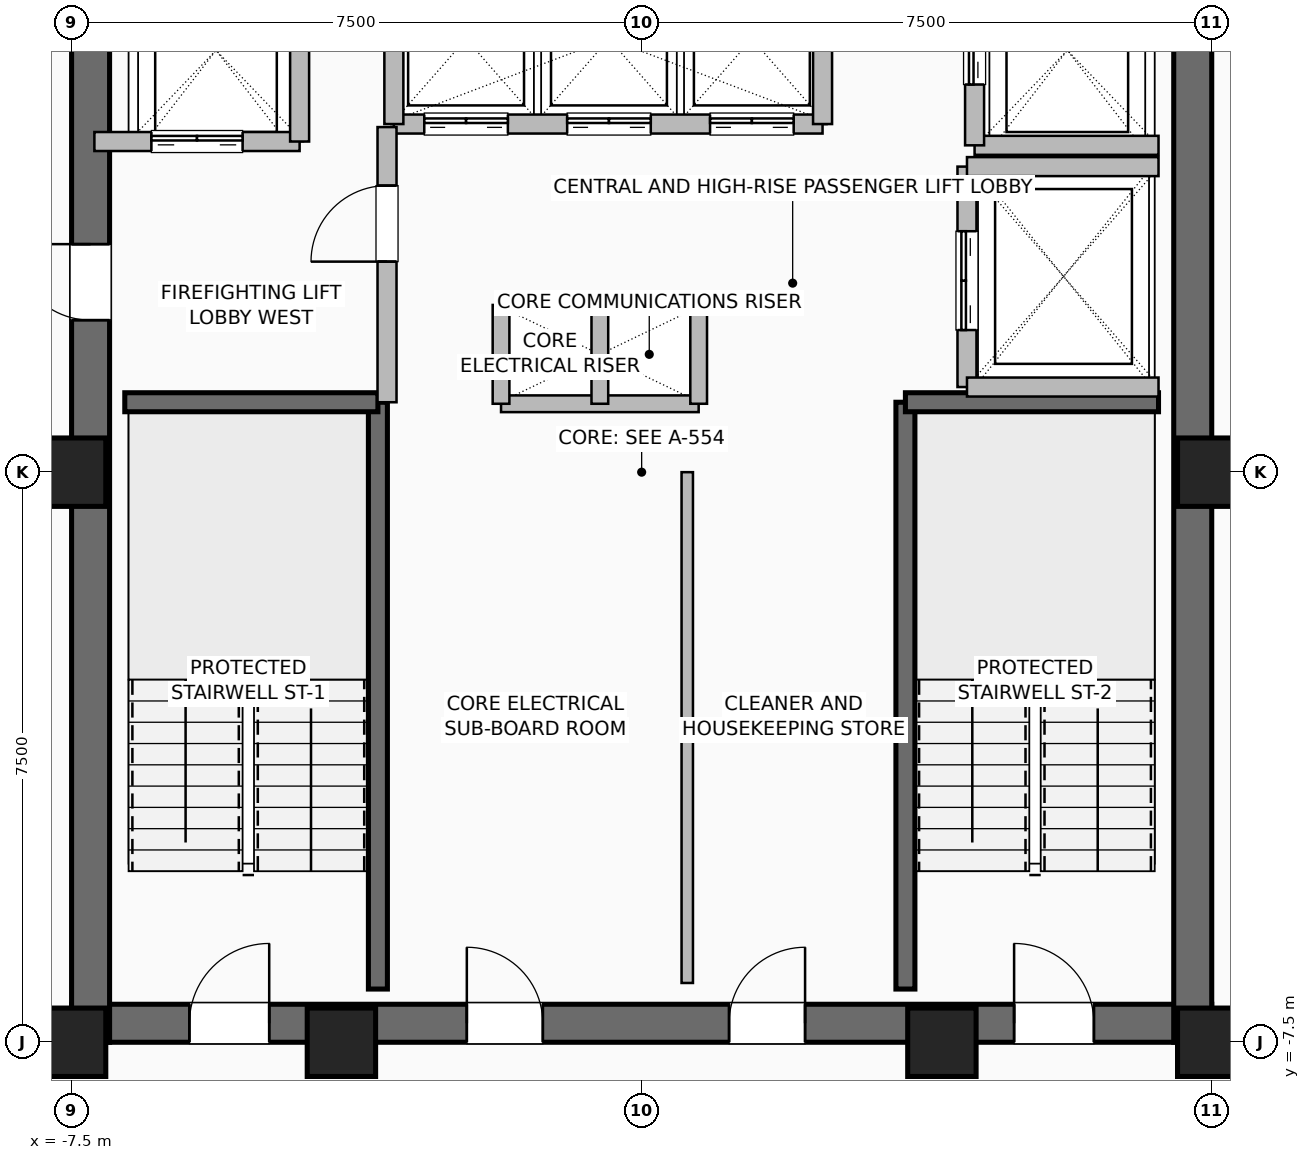
"""IFC4 building model, lengths in metres.
Left out: names, types, materials, properties, quantities, classifications, styles, units other than length and angle.
Written with IfcOpenShell. Run it as: python <this file> out.ifc"""

import sys

from ifc_helpers import new_model, si_unit, direction, frame, frame_2d, origin, origin_2d, place, context, subcontext, project, spatial, rectangle, hollow_rectangle, extrude, element, fill, save


model = new_model("IFC4")
c1 = context("Model", 3, precision=1e-05, world=origin(), true_north=direction((0.0, 1.0)))
c2 = subcontext(c1, "Body", "Model", "MODEL_VIEW")
j1 = project(units=[si_unit("LENGTHUNIT", "METRE"), si_unit("PLANEANGLEUNIT", "RADIAN")], contexts=[c1])
p1 = place(None, origin())
s1 = spatial("IfcSite", under=j1, at=p1, CompositionType="ELEMENT")
p2 = place(p1, origin())
s2 = spatial("IfcBuilding", under=s1, at=p2, CompositionType="ELEMENT")
p3 = place(p2, frame((0.0, 0.0, 213.0)))
s3 = spatial("IfcBuildingStorey", under=s2, at=p3, CompositionType="ELEMENT", Elevation=213.0)
for number, where, z_axis, x_axis in (
    (1, (-7.5, -7.5, 0.0), (0.0, 0.0, 1.0), (1.0, 0.0, 0.0)),
    (2, (-3.95, -7.5, 0.0), (0.0, 0.0, 1.0), (1.0, 0.0, 0.0)),
    (3, (3.95, -7.5, 0.0), (0.0, 0.0, 1.0), (1.0, 0.0, 0.0)),
    (4, (7.5, -7.5, 0.0), (0.0, 0.0, 1.0), (1.0, 0.0, 0.0)),
    (5, (7.5, 0.0, 0.0), (0.0, 0.0, 1.0), (1.0, 0.0, 0.0)),
    (6, (-7.5, 0.0, 0.0), (0.0, 0.0, 1.0), (1.0, 0.0, 0.0)),
):
    element("IfcColumn", number, at=place(p3, frame(where, z_axis=z_axis, x_axis=x_axis)), inside=s3, PredefinedType="COLUMN", context=c2, shape_type="SweptSolid", body=[
        extrude(hollow_rectangle(XDim=0.9, YDim=0.9, WallThickness=0.045, at=origin_2d()), origin(), (0.0, 0.0, 1.0), 3.6),
    ])
p4 = place(p3, frame((-7.5, -7.25, 0.0), z_axis=(0.0, 0.0, 1.0), x_axis=(1.0, 0.0, 0.0)))
e7 = element("IfcWall", 7, at=p4, inside=s3, PredefinedType="SHEAR", context=c2, shape_type="SweptSolid", body=[
    extrude(rectangle(XDim=15.0, YDim=0.5, at=frame_2d((7.5, 0.0))), origin(), (0.0, 0.0, 1.0), 3.36),
])
p5 = place(p4, frame((1.55, 0.0, 0.0)))
e8 = element("IfcOpeningElement", 8, at=p5, cuts=e7, PredefinedType="OPENING", context=c2, shape_type="SweptSolid", body=[
    extrude(rectangle(XDim=1.05, YDim=2.08, at=frame_2d((0.525, 1.04))), frame((0.0, 0.26, 0.0), z_axis=(0.0, -1.0, 0.0), x_axis=(1.0, 0.0, 0.0)), (0.0, 0.0, 1.0), 0.52),
])
p6 = place(p4, frame((12.4, 0.0, 0.0)))
e9 = element("IfcOpeningElement", 9, at=p6, cuts=e7, PredefinedType="OPENING", context=c2, shape_type="SweptSolid", body=[
    extrude(rectangle(XDim=1.05, YDim=2.08, at=frame_2d((0.525, 1.04))), frame((0.0, 0.26, 0.0), z_axis=(0.0, -1.0, 0.0), x_axis=(1.0, 0.0, 0.0)), (0.0, 0.0, 1.0), 0.52),
])
p7 = place(p4, frame((5.2, 0.0, 0.0)))
e10 = element("IfcOpeningElement", 10, at=p7, cuts=e7, PredefinedType="OPENING", context=c2, shape_type="SweptSolid", body=[
    extrude(rectangle(XDim=1.0, YDim=2.08, at=frame_2d((0.5, 1.04))), frame((0.0, 0.26, 0.0), z_axis=(0.0, -1.0, 0.0), x_axis=(1.0, 0.0, 0.0)), (0.0, 0.0, 1.0), 0.52),
])
p8 = place(p4, frame((8.65, 0.0, 0.0)))
e11 = element("IfcOpeningElement", 11, at=p8, cuts=e7, PredefinedType="OPENING", context=c2, shape_type="SweptSolid", body=[
    extrude(rectangle(XDim=1.0, YDim=2.08, at=frame_2d((0.5, 1.04))), frame((0.0, 0.26, 0.0), z_axis=(0.0, -1.0, 0.0), x_axis=(1.0, 0.0, 0.0)), (0.0, 0.0, 1.0), 0.52),
])
p9 = place(p3, frame((-7.25, -7.5, 0.0), z_axis=(0.0, 0.0, 1.0), x_axis=(0.0, 1.0, 0.0)))
e12 = element("IfcWall", 12, at=p9, inside=s3, PredefinedType="SHEAR", context=c2, shape_type="SweptSolid", body=[
    extrude(rectangle(XDim=15.0, YDim=0.5, at=frame_2d((7.5, 0.0))), origin(), (0.0, 0.0, 1.0), 3.36),
])
p10 = place(p9, frame((9.5, 0.0, 0.0)))
e13 = element("IfcOpeningElement", 13, at=p10, cuts=e12, PredefinedType="OPENING", context=c2, shape_type="SweptSolid", body=[
    extrude(rectangle(XDim=1.0, YDim=2.08, at=frame_2d((0.5, 1.04))), frame((0.0, 0.26, 0.0), z_axis=(0.0, -1.0, 0.0), x_axis=(1.0, 0.0, 0.0)), (0.0, 0.0, 1.0), 0.52),
])
p11 = place(p3, frame((7.25, -7.5, 0.0), z_axis=(0.0, 0.0, 1.0), x_axis=(0.0, 1.0, 0.0)))
e14 = element("IfcWall", 14, at=p11, inside=s3, PredefinedType="SHEAR", context=c2, shape_type="SweptSolid", body=[
    extrude(rectangle(XDim=15.0, YDim=0.5, at=frame_2d((7.5, 0.0))), origin(), (0.0, 0.0, 1.0), 3.36),
])
p12 = place(p3, frame((-3.47, -6.8, 0.0), z_axis=(0.0, 0.0, 1.0), x_axis=(0.0, 1.0, 0.0)))
e15 = element("IfcWall", 15, at=p12, inside=s3, PredefinedType="SHEAR", context=c2, shape_type="SweptSolid", body=[
    extrude(rectangle(XDim=7.72, YDim=0.25, at=frame_2d((3.86, 0.0))), origin(), (0.0, 0.0, 1.0), 3.36),
])
p13 = place(p3, frame((-6.8, 0.92, 0.0), z_axis=(0.0, 0.0, 1.0), x_axis=(1.0, 0.0, 0.0)))
e16 = element("IfcWall", 16, at=p13, inside=s3, PredefinedType="SHEAR", context=c2, shape_type="SweptSolid", body=[
    extrude(rectangle(XDim=3.33, YDim=0.25, at=frame_2d((1.665, 0.0))), origin(), (0.0, 0.0, 1.0), 3.36),
])
p14 = place(p3, frame((3.47, -6.8, 0.0), z_axis=(0.0, 0.0, 1.0), x_axis=(0.0, 1.0, 0.0)))
e17 = element("IfcWall", 17, at=p14, inside=s3, PredefinedType="SHEAR", context=c2, shape_type="SweptSolid", body=[
    extrude(rectangle(XDim=7.72, YDim=0.25, at=frame_2d((3.86, 0.0))), origin(), (0.0, 0.0, 1.0), 3.36),
])
p15 = place(p3, frame((3.47, 0.92, 0.0), z_axis=(0.0, 0.0, 1.0), x_axis=(1.0, 0.0, 0.0)))
e18 = element("IfcWall", 18, at=p15, inside=s3, PredefinedType="SHEAR", context=c2, shape_type="SweptSolid", body=[
    extrude(rectangle(XDim=3.33, YDim=0.25, at=frame_2d((1.665, 0.0))), origin(), (0.0, 0.0, 1.0), 3.36),
])
for number, where, z_axis, x_axis in (
    (19, (-1.85, 2.2, 0.0), (0.0, 0.0, 1.0), (1.0, 0.0, 0.0)),
    (20, (-1.85, 0.9, 0.0), (0.0, 0.0, 1.0), (1.0, 0.0, 0.0)),
):
    element("IfcWall", number, at=place(p3, frame(where, z_axis=z_axis, x_axis=x_axis)), inside=s3, PredefinedType="PARTITIONING", context=c2, shape_type="SweptSolid", body=[
        extrude(rectangle(XDim=2.6, YDim=0.22, at=frame_2d((1.3, 0.0))), origin(), (0.0, 0.0, 1.0), 3.36),
    ])
for number, where, z_axis, x_axis in (
    (21, (-0.55, 0.9, 0.0), (0.0, 0.0, 1.0), (0.0, 1.0, 0.0)),
    (22, (0.75, 0.9, 0.0), (0.0, 0.0, 1.0), (0.0, 1.0, 0.0)),
    (23, (-1.85, 0.9, 0.0), (0.0, 0.0, 1.0), (0.0, 1.0, 0.0)),
):
    element("IfcWall", number, at=place(p3, frame(where, z_axis=z_axis, x_axis=x_axis)), inside=s3, PredefinedType="PARTITIONING", context=c2, shape_type="SweptSolid", body=[
        extrude(rectangle(XDim=1.3, YDim=0.22, at=frame_2d((0.65, 0.0))), origin(), (0.0, 0.0, 1.0), 3.36),
    ])
p16 = place(p3, frame((-3.26, 4.58, 0.0), z_axis=(0.0, 0.0, 1.0), x_axis=(1.0, 0.0, 0.0)))
e24 = element("IfcWall", 24, at=p16, inside=s3, PredefinedType="SHEAR", context=c2, shape_type="SweptSolid", body=[
    extrude(rectangle(XDim=5.64, YDim=0.25, at=frame_2d((2.82, 0.0))), origin(), (0.0, 0.0, 1.0), 3.36),
])
p17 = place(p16, frame((0.4, 0.0, 0.0)))
e25 = element("IfcOpeningElement", 25, at=p17, cuts=e24, PredefinedType="OPENING", context=c2, shape_type="SweptSolid", body=[
    extrude(rectangle(XDim=1.1, YDim=2.2, at=frame_2d((0.55, 1.1))), frame((0.0, 0.135, 0.0), z_axis=(0.0, -1.0, 0.0), x_axis=(1.0, 0.0, 0.0)), (0.0, 0.0, 1.0), 0.27),
])
p18 = place(p16, frame((2.28, 0.0, 0.0)))
e26 = element("IfcOpeningElement", 26, at=p18, cuts=e24, PredefinedType="OPENING", context=c2, shape_type="SweptSolid", body=[
    extrude(rectangle(XDim=1.1, YDim=2.2, at=frame_2d((0.55, 1.1))), frame((0.0, 0.135, 0.0), z_axis=(0.0, -1.0, 0.0), x_axis=(1.0, 0.0, 0.0)), (0.0, 0.0, 1.0), 0.27),
])
p19 = place(p16, frame((4.16, 0.0, 0.0)))
e27 = element("IfcOpeningElement", 27, at=p19, cuts=e24, PredefinedType="OPENING", context=c2, shape_type="SweptSolid", body=[
    extrude(rectangle(XDim=1.1, YDim=2.2, at=frame_2d((0.55, 1.1))), frame((0.0, 0.135, 0.0), z_axis=(0.0, -1.0, 0.0), x_axis=(1.0, 0.0, 0.0)), (0.0, 0.0, 1.0), 0.27),
])
for number, where, z_axis, x_axis in (
    (28, (-3.26, 4.58, 0.0), (0.0, 0.0, 1.0), (0.0, 1.0, 0.0)),
    (29, (2.38, 4.58, 0.0), (0.0, 0.0, 1.0), (0.0, 1.0, 0.0)),
):
    element("IfcWall", number, at=place(p3, frame(where, z_axis=z_axis, x_axis=x_axis)), inside=s3, PredefinedType="SHEAR", context=c2, shape_type="SweptSolid", body=[
        extrude(rectangle(XDim=2.22, YDim=0.25, at=frame_2d((1.11, 0.0))), origin(), (0.0, 0.0, 1.0), 3.36),
    ])
p20 = place(p3, frame((-7.2, 4.35, 0.0), z_axis=(0.0, 0.0, 1.0), x_axis=(1.0, 0.0, 0.0)))
e30 = element("IfcWall", 30, at=p20, inside=s3, PredefinedType="SHEAR", context=c2, shape_type="SweptSolid", body=[
    extrude(rectangle(XDim=2.7, YDim=0.25, at=frame_2d((1.35, 0.0))), origin(), (0.0, 0.0, 1.0), 3.36),
])
p21 = place(p20, frame((0.75, 0.0, 0.0)))
e31 = element("IfcOpeningElement", 31, at=p21, cuts=e30, PredefinedType="OPENING", context=c2, shape_type="SweptSolid", body=[
    extrude(rectangle(XDim=1.2, YDim=2.2, at=frame_2d((0.6, 1.1))), frame((0.0, 0.135, 0.0), z_axis=(0.0, -1.0, 0.0), x_axis=(1.0, 0.0, 0.0)), (0.0, 0.0, 1.0), 0.27),
])
p22 = place(p3, frame((-4.5, 4.35, 0.0), z_axis=(0.0, 0.0, 1.0), x_axis=(0.0, 1.0, 0.0)))
e32 = element("IfcWall", 32, at=p22, inside=s3, PredefinedType="SHEAR", context=c2, shape_type="SweptSolid", body=[
    extrude(rectangle(XDim=2.85, YDim=0.25, at=frame_2d((1.425, 0.0))), origin(), (0.0, 0.0, 1.0), 3.36),
])
p23 = place(p3, frame((4.38, 4.3, 0.0), z_axis=(0.0, 0.0, 1.0), x_axis=(1.0, 0.0, 0.0)))
e33 = element("IfcWall", 33, at=p23, inside=s3, PredefinedType="SHEAR", context=c2, shape_type="SweptSolid", body=[
    extrude(rectangle(XDim=2.42, YDim=0.25, at=frame_2d((1.21, 0.0))), origin(), (0.0, 0.0, 1.0), 3.36),
])
p24 = place(p3, frame((4.38, 4.3, 0.0), z_axis=(0.0, 0.0, 1.0), x_axis=(0.0, 1.0, 0.0)))
e34 = element("IfcWall", 34, at=p24, inside=s3, PredefinedType="SHEAR", context=c2, shape_type="SweptSolid", body=[
    extrude(rectangle(XDim=2.5, YDim=0.25, at=frame_2d((1.25, 0.0))), origin(), (0.0, 0.0, 1.0), 3.36),
])
p25 = place(p24, frame((0.8, 0.0, 0.0)))
e35 = element("IfcOpeningElement", 35, at=p25, cuts=e34, PredefinedType="OPENING", context=c2, shape_type="SweptSolid", body=[
    extrude(rectangle(XDim=1.2, YDim=2.2, at=frame_2d((0.6, 1.1))), frame((0.0, 0.135, 0.0), z_axis=(0.0, -1.0, 0.0), x_axis=(1.0, 0.0, 0.0)), (0.0, 0.0, 1.0), 0.27),
])
p26 = place(p3, frame((4.28, 1.12, 0.0), z_axis=(0.0, 0.0, 1.0), x_axis=(0.0, 1.0, 0.0)))
e36 = element("IfcWall", 36, at=p26, inside=s3, PredefinedType="SHEAR", context=c2, shape_type="SweptSolid", body=[
    extrude(rectangle(XDim=2.9, YDim=0.25, at=frame_2d((1.45, 0.0))), origin(), (0.0, 0.0, 1.0), 3.36),
])
p27 = place(p26, frame((0.75, 0.0, 0.0)))
e37 = element("IfcOpeningElement", 37, at=p27, cuts=e36, PredefinedType="OPENING", context=c2, shape_type="SweptSolid", body=[
    extrude(rectangle(XDim=1.3, YDim=2.3, at=frame_2d((0.65, 1.15))), frame((0.0, 0.135, 0.0), z_axis=(0.0, -1.0, 0.0), x_axis=(1.0, 0.0, 0.0)), (0.0, 0.0, 1.0), 0.27),
])
for number, where, z_axis, x_axis in (
    (38, (4.28, 1.12, 0.0), (0.0, 0.0, 1.0), (1.0, 0.0, 0.0)),
    (39, (4.28, 4.02, 0.0), (0.0, 0.0, 1.0), (1.0, 0.0, 0.0)),
):
    element("IfcWall", number, at=place(p3, frame(where, z_axis=z_axis, x_axis=x_axis)), inside=s3, PredefinedType="SHEAR", context=c2, shape_type="SweptSolid", body=[
        extrude(rectangle(XDim=2.52, YDim=0.25, at=frame_2d((1.26, 0.0))), origin(), (0.0, 0.0, 1.0), 3.36),
    ])
p28 = place(p3, frame((-3.35, 0.92, 0.0), z_axis=(0.0, 0.0, 1.0), x_axis=(0.0, 1.0, 0.0)))
e40 = element("IfcWall", 40, at=p28, inside=s3, PredefinedType="SHEAR", context=c2, shape_type="SweptSolid", body=[
    extrude(rectangle(XDim=3.62, YDim=0.25, at=frame_2d((1.81, 0.0))), origin(), (0.0, 0.0, 1.0), 3.36),
])
p29 = place(p28, frame((1.85, 0.0, 0.0)))
e41 = element("IfcOpeningElement", 41, at=p29, cuts=e40, PredefinedType="OPENING", context=c2, shape_type="SweptSolid", body=[
    extrude(rectangle(XDim=1.0, YDim=2.08, at=frame_2d((0.5, 1.04))), frame((0.0, 0.135, 0.0), z_axis=(0.0, -1.0, 0.0), x_axis=(1.0, 0.0, 0.0)), (0.0, 0.0, 1.0), 0.27),
])
p30 = place(p3, frame((0.6, -6.72, 0.0), z_axis=(0.0, 0.0, 1.0), x_axis=(0.0, 1.0, 0.0)))
e42 = element("IfcWall", 42, at=p30, inside=s3, PredefinedType="PARTITIONING", context=c2, shape_type="SweptSolid", body=[
    extrude(rectangle(XDim=6.72, YDim=0.15, at=frame_2d((3.36, 0.0))), origin(), (0.0, 0.0, 1.0), 3.36),
])
p31 = place(p3, frame((7.45, -7.48, 0.0), z_axis=(0.0, 0.0, 1.0), x_axis=(1.0, 0.0, 0.0)))
e43 = element("IfcWall", 43, at=p31, inside=s3, PredefinedType="PARTITIONING", context=c2, shape_type="SweptSolid", body=[
    extrude(rectangle(XDim=0.95, YDim=0.15, at=frame_2d((0.475, 0.0))), origin(), (0.0, 0.0, 1.0), 3.36),
])
p32 = place(p5, origin())
e44 = element("IfcDoor", 44, at=p32, inside=s3, OperationType="SINGLE_SWING_RIGHT", PredefinedType="DOOR", context=c2, shape_type="SweptSolid", body=[
    extrude(rectangle(XDim=1.05, YDim=2.08, at=frame_2d((0.525, 1.04))), frame((0.0, 0.025, 0.0), z_axis=(0.0, -1.0, 0.0), x_axis=(1.0, 0.0, 0.0)), (0.0, 0.0, 1.0), 0.05),
])
fill(e8, e44)
p33 = place(p6, origin())
e45 = element("IfcDoor", 45, at=p33, inside=s3, OperationType="SINGLE_SWING_LEFT", PredefinedType="DOOR", context=c2, shape_type="SweptSolid", body=[
    extrude(rectangle(XDim=1.05, YDim=2.08, at=frame_2d((0.525, 1.04))), frame((0.0, 0.025, 0.0), z_axis=(0.0, -1.0, 0.0), x_axis=(1.0, 0.0, 0.0)), (0.0, 0.0, 1.0), 0.05),
])
fill(e9, e45)
p34 = place(p10, origin())
e46 = element("IfcDoor", 46, at=p34, inside=s3, OperationType="SINGLE_SWING_RIGHT", PredefinedType="DOOR", context=c2, shape_type="SweptSolid", body=[
    extrude(rectangle(XDim=1.0, YDim=2.08, at=frame_2d((0.5, 1.04))), frame((0.0, 0.025, 0.0), z_axis=(0.0, -1.0, 0.0), x_axis=(1.0, 0.0, 0.0)), (0.0, 0.0, 1.0), 0.05),
])
fill(e13, e46)
p35 = place(p7, origin())
e47 = element("IfcDoor", 47, at=p35, inside=s3, OperationType="SINGLE_SWING_LEFT", PredefinedType="DOOR", context=c2, shape_type="SweptSolid", body=[
    extrude(rectangle(XDim=1.0, YDim=2.08, at=frame_2d((0.5, 1.04))), frame((0.0, 0.025, 0.0), z_axis=(0.0, -1.0, 0.0), x_axis=(1.0, 0.0, 0.0)), (0.0, 0.0, 1.0), 0.05),
])
fill(e10, e47)
p36 = place(p8, origin())
e48 = element("IfcDoor", 48, at=p36, inside=s3, OperationType="SINGLE_SWING_RIGHT", PredefinedType="DOOR", context=c2, shape_type="SweptSolid", body=[
    extrude(rectangle(XDim=1.0, YDim=2.08, at=frame_2d((0.5, 1.04))), frame((0.0, 0.025, 0.0), z_axis=(0.0, -1.0, 0.0), x_axis=(1.0, 0.0, 0.0)), (0.0, 0.0, 1.0), 0.05),
])
fill(e11, e48)
p37 = place(p17, origin())
e49 = element("IfcDoor", 49, at=p37, inside=s3, OperationType="DOUBLE_DOOR_SLIDING", PredefinedType="DOOR", context=c2, shape_type="SweptSolid", body=[
    extrude(rectangle(XDim=1.1, YDim=2.2, at=frame_2d((0.55, 1.1))), frame((0.0, 0.025, 0.0), z_axis=(0.0, -1.0, 0.0), x_axis=(1.0, 0.0, 0.0)), (0.0, 0.0, 1.0), 0.05),
])
fill(e25, e49)
p38 = place(p18, origin())
e50 = element("IfcDoor", 50, at=p38, inside=s3, OperationType="DOUBLE_DOOR_SLIDING", PredefinedType="DOOR", context=c2, shape_type="SweptSolid", body=[
    extrude(rectangle(XDim=1.1, YDim=2.2, at=frame_2d((0.55, 1.1))), frame((0.0, 0.025, 0.0), z_axis=(0.0, -1.0, 0.0), x_axis=(1.0, 0.0, 0.0)), (0.0, 0.0, 1.0), 0.05),
])
fill(e26, e50)
p39 = place(p19, origin())
e51 = element("IfcDoor", 51, at=p39, inside=s3, OperationType="DOUBLE_DOOR_SLIDING", PredefinedType="DOOR", context=c2, shape_type="SweptSolid", body=[
    extrude(rectangle(XDim=1.1, YDim=2.2, at=frame_2d((0.55, 1.1))), frame((0.0, 0.025, 0.0), z_axis=(0.0, -1.0, 0.0), x_axis=(1.0, 0.0, 0.0)), (0.0, 0.0, 1.0), 0.05),
])
fill(e27, e51)
p40 = place(p21, origin())
e52 = element("IfcDoor", 52, at=p40, inside=s3, OperationType="DOUBLE_DOOR_SLIDING", PredefinedType="DOOR", context=c2, shape_type="SweptSolid", body=[
    extrude(rectangle(XDim=1.2, YDim=2.2, at=frame_2d((0.6, 1.1))), frame((0.0, 0.025, 0.0), z_axis=(0.0, -1.0, 0.0), x_axis=(1.0, 0.0, 0.0)), (0.0, 0.0, 1.0), 0.05),
])
fill(e31, e52)
p41 = place(p25, origin())
e53 = element("IfcDoor", 53, at=p41, inside=s3, OperationType="DOUBLE_DOOR_SLIDING", PredefinedType="DOOR", context=c2, shape_type="SweptSolid", body=[
    extrude(rectangle(XDim=1.2, YDim=2.2, at=frame_2d((0.6, 1.1))), frame((0.0, 0.025, 0.0), z_axis=(0.0, -1.0, 0.0), x_axis=(1.0, 0.0, 0.0)), (0.0, 0.0, 1.0), 0.05),
])
fill(e35, e53)
p42 = place(p27, origin())
e54 = element("IfcDoor", 54, at=p42, inside=s3, OperationType="DOUBLE_DOOR_SLIDING", PredefinedType="DOOR", context=c2, shape_type="SweptSolid", body=[
    extrude(rectangle(XDim=1.3, YDim=2.3, at=frame_2d((0.65, 1.15))), frame((0.0, 0.025, 0.0), z_axis=(0.0, -1.0, 0.0), x_axis=(1.0, 0.0, 0.0)), (0.0, 0.0, 1.0), 0.05),
])
fill(e37, e54)
p43 = place(p29, origin())
e55 = element("IfcDoor", 55, at=p43, inside=s3, OperationType="SINGLE_SWING_LEFT", PredefinedType="DOOR", context=c2, shape_type="SweptSolid", body=[
    extrude(rectangle(XDim=1.0, YDim=2.08, at=frame_2d((0.5, 1.04))), frame((0.0, 0.025, 0.0), z_axis=(0.0, -1.0, 0.0), x_axis=(1.0, 0.0, 0.0)), (0.0, 0.0, 1.0), 0.05),
])
fill(e41, e55)
save(model, sys.argv[1])
